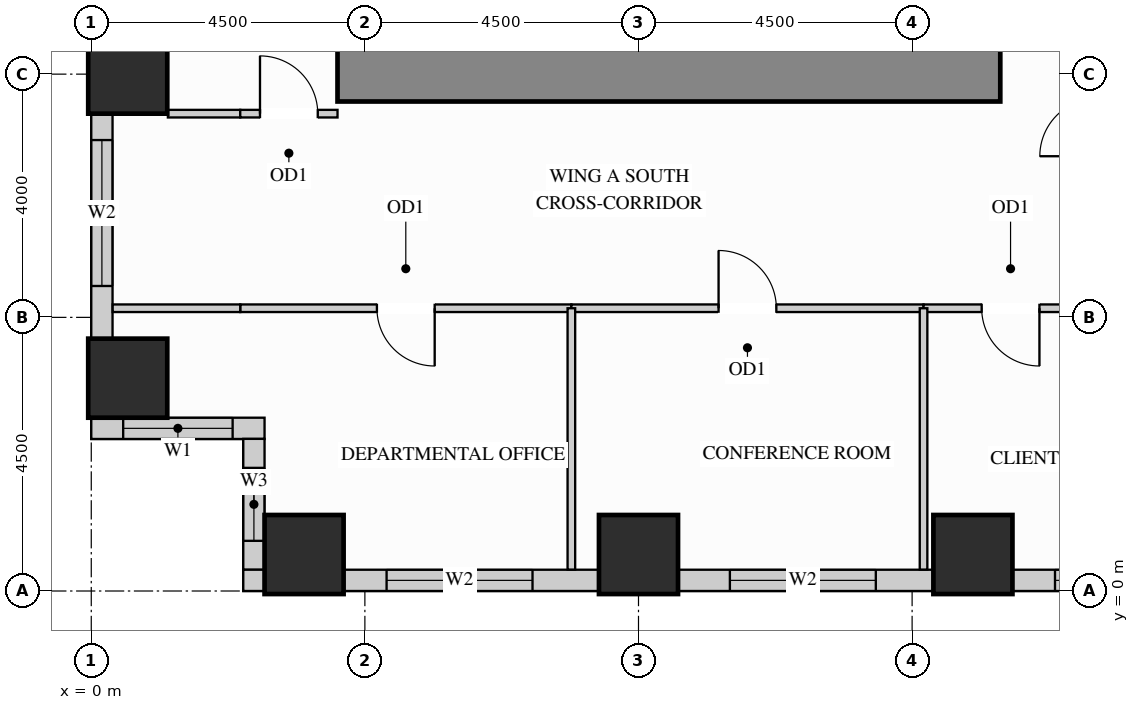
"""IFC4 building model, lengths in metres.
Left out: names, types, materials, properties, quantities, classifications, styles, units other than length and angle.
Written with IfcOpenShell. Run it as: python <this file> out.ifc"""

import sys

from ifc_helpers import new_model, si_unit, direction, frame, frame_2d, origin, origin_2d, place, context, subcontext, project, spatial, rectangle, extrude, source, transform, mapped, element, fill, save


model = new_model("IFC4")
c1 = context("Model", 3, precision=1e-05, world=origin(), true_north=direction((0.0, 1.0)))
c2 = subcontext(c1, "Body", "Model", "MODEL_VIEW")
j1 = project(units=[si_unit("LENGTHUNIT", "METRE"), si_unit("PLANEANGLEUNIT", "RADIAN")], contexts=[c1])
p1 = place(None, origin())
s1 = spatial("IfcSite", under=j1, at=p1, CompositionType="ELEMENT")
p2 = place(p1, origin())
s2 = spatial("IfcBuilding", under=s1, at=p2, CompositionType="ELEMENT")
p3 = place(p2, frame((0.0, 0.0, 44.1)))
s3 = spatial("IfcBuildingStorey", under=s2, at=p3, CompositionType="ELEMENT", Elevation=44.1)
m1 = source(origin(), c2, "Body", "SweptSolid", [
    extrude(rectangle(XDim=1.3, YDim=1.3, at=origin_2d()), origin(), (0.0, 0.0, 1.0), 3.38),
])
for number, where, z_axis, x_axis in (
    (1, (14.5, 0.6, 0.0), (0.0, 0.0, 1.0), (1.0, 0.0, 0.0)),
    (2, (3.5, 0.6, 0.0), (0.0, 0.0, 1.0), (1.0, 0.0, 0.0)),
    (3, (9.0, 0.6, 0.0), (0.0, 0.0, 1.0), (1.0, 0.0, 0.0)),
    (4, (0.6, 3.5, 0.0), (0.0, 0.0, 1.0), (1.0, 0.0, 0.0)),
    (5, (0.6, 8.5, 0.0), (0.0, 0.0, 1.0), (1.0, 0.0, 0.0)),
):
    element("IfcColumn", number, at=place(p3, frame(where, z_axis=z_axis, x_axis=x_axis)), inside=s3, PredefinedType="COLUMN", context=c2, shape_type="MappedRepresentation", body=[
        mapped(m1, transform((0.0, 0.0, 0.0), x_axis=(1.0, 0.0, 0.0), y_axis=(0.0, 1.0, 0.0), z_axis=(0.0, 0.0, 1.0))),
    ])
m2 = source(origin(), c2, "Body", "SweptSolid", [
    extrude(rectangle(XDim=10.9, YDim=0.9, at=frame_2d((5.45, 0.0))), origin(), (0.0, 0.0, 1.0), 3.38),
])
p4 = place(p3, frame((4.05, 8.5, 0.0), z_axis=(0.0, 0.0, 1.0), x_axis=(1.0, 0.0, 0.0)))
e6 = element("IfcWall", 6, at=p4, inside=s3, PredefinedType="SHEAR", context=c2, shape_type="MappedRepresentation", body=[
    mapped(m2, transform((0.0, 0.0, 0.0), x_axis=(1.0, 0.0, 0.0), y_axis=(0.0, 1.0, 0.0), z_axis=(0.0, 0.0, 1.0))),
])
p5 = place(p3, frame((0.175, 7.852, 0.0), z_axis=(0.0, 0.0, 1.0), x_axis=(0.0, -1.0, 0.0)))
e7 = element("IfcWall", 7, at=p5, inside=s3, PredefinedType="SOLIDWALL", context=c2, shape_type="SweptSolid", body=[
    extrude(rectangle(XDim=3.704, YDim=0.35, at=frame_2d((1.852, 0.0))), origin(), (0.0, 0.0, 1.0), 2.51),
])
p6 = place(p5, frame((0.436, 0.0, 0.78)))
e8 = element("IfcOpeningElement", 8, at=p6, cuts=e7, PredefinedType="OPENING", context=c2, shape_type="SweptSolid", body=[
    extrude(rectangle(XDim=2.4, YDim=1.55, at=frame_2d((1.2, 0.775))), frame((0.0, 0.185, 0.0), z_axis=(0.0, -1.0, 0.0), x_axis=(1.0, 0.0, 0.0)), (0.0, 0.0, 1.0), 0.37),
])
p7 = place(p3, frame((0.0, 2.675, 0.0), z_axis=(0.0, 0.0, 1.0), x_axis=(1.0, 0.0, 0.0)))
e9 = element("IfcWall", 9, at=p7, inside=s3, PredefinedType="SOLIDWALL", context=c2, shape_type="SweptSolid", body=[
    extrude(rectangle(XDim=2.85, YDim=0.35, at=frame_2d((1.425, 0.0))), origin(), (0.0, 0.0, 1.0), 3.365),
])
p8 = place(p7, frame((0.525, 0.0, 0.78)))
e10 = element("IfcOpeningElement", 10, at=p8, cuts=e9, PredefinedType="OPENING", context=c2, shape_type="SweptSolid", body=[
    extrude(rectangle(XDim=1.8, YDim=2.1, at=frame_2d((0.9, 1.05))), frame((0.0, 0.185, 0.0), z_axis=(0.0, -1.0, 0.0), x_axis=(1.0, 0.0, 0.0)), (0.0, 0.0, 1.0), 0.37),
])
p9 = place(p3, frame((2.675, 2.502, 0.0), z_axis=(0.0, 0.0, 1.0), x_axis=(0.0, -1.0, 0.0)))
e11 = element("IfcWall", 11, at=p9, inside=s3, PredefinedType="SOLIDWALL", context=c2, shape_type="SweptSolid", body=[
    extrude(rectangle(XDim=2.154, YDim=0.35, at=frame_2d((1.077, 0.0))), origin(), (0.0, 0.0, 1.0), 3.365),
])
p10 = place(p9, frame((0.477, 0.0, 0.78)))
e12 = element("IfcOpeningElement", 12, at=p10, cuts=e11, PredefinedType="OPENING", context=c2, shape_type="SweptSolid", body=[
    extrude(rectangle(XDim=1.2, YDim=2.1, at=frame_2d((0.6, 1.05))), frame((0.0, 0.185, 0.0), z_axis=(0.0, -1.0, 0.0), x_axis=(1.0, 0.0, 0.0)), (0.0, 0.0, 1.0), 0.37),
])
m3 = source(origin(), c2, "Body", "SweptSolid", [
    extrude(rectangle(XDim=0.352, YDim=0.35, at=frame_2d((0.176, 0.0))), origin(), (0.0, 0.0, 1.0), 3.365),
])
p11 = place(p3, frame((2.5, 0.175, 0.0), z_axis=(0.0, 0.0, 1.0), x_axis=(1.0, 0.0, 0.0)))
e13 = element("IfcWall", 13, at=p11, inside=s3, PredefinedType="SOLIDWALL", context=c2, shape_type="MappedRepresentation", body=[
    mapped(m3, transform((0.0, 0.0, 0.0), x_axis=(1.0, 0.0, 0.0), y_axis=(0.0, 1.0, 0.0), z_axis=(0.0, 0.0, 1.0))),
])
p12 = place(p3, frame((4.148, 0.175, 0.0), z_axis=(0.0, 0.0, 1.0), x_axis=(1.0, 0.0, 0.0)))
e14 = element("IfcWall", 14, at=p12, inside=s3, PredefinedType="SOLIDWALL", context=c2, shape_type="SweptSolid", body=[
    extrude(rectangle(XDim=4.204, YDim=0.35, at=frame_2d((2.102, 0.0))), origin(), (0.0, 0.0, 1.0), 2.51),
])
p13 = place(p12, frame((0.709, 0.0, 0.78)))
e15 = element("IfcOpeningElement", 15, at=p13, cuts=e14, PredefinedType="OPENING", context=c2, shape_type="SweptSolid", body=[
    extrude(rectangle(XDim=2.4, YDim=1.55, at=frame_2d((1.2, 0.775))), frame((0.0, 0.185, 0.0), z_axis=(0.0, -1.0, 0.0), x_axis=(1.0, 0.0, 0.0)), (0.0, 0.0, 1.0), 0.37),
])
p14 = place(p3, frame((9.648, 0.175, 0.0), z_axis=(0.0, 0.0, 1.0), x_axis=(1.0, 0.0, 0.0)))
e16 = element("IfcWall", 16, at=p14, inside=s3, PredefinedType="SOLIDWALL", context=c2, shape_type="SweptSolid", body=[
    extrude(rectangle(XDim=4.204, YDim=0.35, at=frame_2d((2.102, 0.0))), origin(), (0.0, 0.0, 1.0), 2.51),
])
p15 = place(p14, frame((0.855, 0.0, 0.78)))
e17 = element("IfcOpeningElement", 17, at=p15, cuts=e16, PredefinedType="OPENING", context=c2, shape_type="SweptSolid", body=[
    extrude(rectangle(XDim=2.4, YDim=1.55, at=frame_2d((1.2, 0.775))), frame((0.0, 0.185, 0.0), z_axis=(0.0, -1.0, 0.0), x_axis=(1.0, 0.0, 0.0)), (0.0, 0.0, 1.0), 0.37),
])
p16 = place(p3, frame((15.148, 0.175, 0.0), z_axis=(0.0, 0.0, 1.0), x_axis=(1.0, 0.0, 0.0)))
e18 = element("IfcWall", 18, at=p16, inside=s3, PredefinedType="SOLIDWALL", context=c2, shape_type="SweptSolid", body=[
    extrude(rectangle(XDim=3.204, YDim=0.35, at=frame_2d((1.602, 0.0))), origin(), (0.0, 0.0, 1.0), 2.51),
])
p17 = place(p16, frame((0.702, 0.0, 0.78)))
e19 = element("IfcOpeningElement", 19, at=p17, cuts=e18, PredefinedType="OPENING", context=c2, shape_type="SweptSolid", body=[
    extrude(rectangle(XDim=1.8, YDim=1.55, at=frame_2d((0.9, 0.775))), frame((0.0, 0.185, 0.0), z_axis=(0.0, -1.0, 0.0), x_axis=(1.0, 0.0, 0.0)), (0.0, 0.0, 1.0), 0.37),
])
m4 = source(origin(), c2, "Body", "SweptSolid", [
    extrude(rectangle(XDim=1.19, YDim=0.125, at=frame_2d((0.595, 0.0))), origin(), (0.0, 0.0, 1.0), 3.365),
])
p18 = place(p3, frame((1.26, 7.85, 0.0), z_axis=(0.0, 0.0, 1.0), x_axis=(1.0, 0.0, 0.0)))
e20 = element("IfcWall", 20, at=p18, inside=s3, PredefinedType="PARTITIONING", context=c2, shape_type="MappedRepresentation", body=[
    mapped(m4, transform((0.0, 0.0, 0.0), x_axis=(1.0, 0.0, 0.0), y_axis=(0.0, 1.0, 0.0), z_axis=(0.0, 0.0, 1.0))),
])
p19 = place(p3, frame((2.45, 7.85, 0.0), z_axis=(0.0, 0.0, 1.0), x_axis=(1.0, 0.0, 0.0)))
e21 = element("IfcWall", 21, at=p19, inside=s3, PredefinedType="PARTITIONING", context=c2, shape_type="SweptSolid", body=[
    extrude(rectangle(XDim=1.6, YDim=0.125, at=frame_2d((0.8, 0.0))), origin(), (0.0, 0.0, 1.0), 3.365),
])
p20 = place(p19, frame((0.325, 0.0, 0.0)))
e22 = element("IfcOpeningElement", 22, at=p20, cuts=e21, PredefinedType="OPENING", context=c2, shape_type="SweptSolid", body=[
    extrude(rectangle(XDim=0.95, YDim=2.15, at=frame_2d((0.475, 1.075))), frame((0.0, 0.073, 0.0), z_axis=(0.0, -1.0, 0.0), x_axis=(1.0, 0.0, 0.0)), (0.0, 0.0, 1.0), 0.145),
])
p21 = place(p3, frame((2.45, 4.65, 0.0), z_axis=(0.0, 0.0, 1.0), x_axis=(1.0, 0.0, 0.0)))
e23 = element("IfcWall", 23, at=p21, inside=s3, PredefinedType="PARTITIONING", context=c2, shape_type="SweptSolid", body=[
    extrude(rectangle(XDim=5.446, YDim=0.125, at=frame_2d((2.723, 0.0))), origin(), (0.0, 0.0, 1.0), 2.828),
])
p22 = place(p21, frame((2.248, 0.0, 0.0)))
e24 = element("IfcOpeningElement", 24, at=p22, cuts=e23, PredefinedType="OPENING", context=c2, shape_type="SweptSolid", body=[
    extrude(rectangle(XDim=0.95, YDim=2.15, at=frame_2d((0.475, 1.075))), frame((0.0, 0.073, 0.0), z_axis=(0.0, -1.0, 0.0), x_axis=(1.0, 0.0, 0.0)), (0.0, 0.0, 1.0), 0.145),
])
p23 = place(p3, frame((7.896, 4.65, 0.0), z_axis=(0.0, 0.0, 1.0), x_axis=(1.0, 0.0, 0.0)))
e25 = element("IfcWall", 25, at=p23, inside=s3, PredefinedType="PARTITIONING", context=c2, shape_type="SweptSolid", body=[
    extrude(rectangle(XDim=5.792, YDim=0.125, at=frame_2d((2.896, 0.0))), origin(), (0.0, 0.0, 1.0), 2.828),
])
p24 = place(p23, frame((2.421, 0.0, 0.0)))
e26 = element("IfcOpeningElement", 26, at=p24, cuts=e25, PredefinedType="OPENING", context=c2, shape_type="SweptSolid", body=[
    extrude(rectangle(XDim=0.95, YDim=2.15, at=frame_2d((0.475, 1.075))), frame((0.0, 0.073, 0.0), z_axis=(0.0, -1.0, 0.0), x_axis=(1.0, 0.0, 0.0)), (0.0, 0.0, 1.0), 0.145),
])
p25 = place(p3, frame((13.688, 4.65, 0.0), z_axis=(0.0, 0.0, 1.0), x_axis=(1.0, 0.0, 0.0)))
e27 = element("IfcWall", 27, at=p25, inside=s3, PredefinedType="PARTITIONING", context=c2, shape_type="SweptSolid", body=[
    extrude(rectangle(XDim=2.862, YDim=0.125, at=frame_2d((1.431, 0.0))), origin(), (0.0, 0.0, 1.0), 2.828),
])
p26 = place(p25, frame((0.956, 0.0, 0.0)))
e28 = element("IfcOpeningElement", 28, at=p26, cuts=e27, PredefinedType="OPENING", context=c2, shape_type="SweptSolid", body=[
    extrude(rectangle(XDim=0.95, YDim=2.15, at=frame_2d((0.475, 1.075))), frame((0.0, 0.073, 0.0), z_axis=(0.0, -1.0, 0.0), x_axis=(1.0, 0.0, 0.0)), (0.0, 0.0, 1.0), 0.145),
])
m5 = source(origin(), c2, "Body", "SweptSolid", [
    extrude(rectangle(XDim=2.098, YDim=0.125, at=frame_2d((1.049, 0.0))), origin(), (0.0, 0.0, 1.0), 2.828),
])
p27 = place(p3, frame((0.352, 4.65, 0.0), z_axis=(0.0, 0.0, 1.0), x_axis=(1.0, 0.0, 0.0)))
e29 = element("IfcWall", 29, at=p27, inside=s3, PredefinedType="PARTITIONING", context=c2, shape_type="MappedRepresentation", body=[
    mapped(m5, transform((0.0, 0.0, 0.0), x_axis=(1.0, 0.0, 0.0), y_axis=(0.0, 1.0, 0.0), z_axis=(0.0, 0.0, 1.0))),
])
m6 = source(origin(), c2, "Body", "SweptSolid", [
    extrude(rectangle(XDim=4.298, YDim=0.125, at=frame_2d((2.149, 0.0))), origin(), (0.0, 0.0, 1.0), 3.365),
])
for number, where, z_axis, x_axis in (
    (30, (7.896, 0.352, 0.0), (0.0, 0.0, 1.0), (0.0, 1.0, 0.0)),
    (31, (13.688, 0.352, 0.0), (0.0, 0.0, 1.0), (0.0, 1.0, 0.0)),
):
    element("IfcWall", number, at=place(p3, frame(where, z_axis=z_axis, x_axis=x_axis)), inside=s3, PredefinedType="PARTITIONING", context=c2, shape_type="MappedRepresentation", body=[
        mapped(m6, transform((0.0, 0.0, 0.0), x_axis=(1.0, 0.0, 0.0), y_axis=(0.0, 1.0, 0.0), z_axis=(0.0, 0.0, 1.0))),
    ])
m7 = source(origin(), c2, "Body", "SweptSolid", [
    extrude(rectangle(XDim=0.95, YDim=2.15, at=frame_2d((0.475, 1.075))), frame((0.0, 0.025, 0.0), z_axis=(0.0, -1.0, 0.0), x_axis=(1.0, 0.0, 0.0)), (0.0, 0.0, 1.0), 0.05),
])
p28 = place(p22, origin())
e32 = element("IfcDoor", 32, at=p28, inside=s3, OperationType="SINGLE_SWING_RIGHT", PredefinedType="DOOR", context=c2, shape_type="MappedRepresentation", body=[
    mapped(m7, transform((0.0, 0.0, 0.0), x_axis=(1.0, 0.0, 0.0), y_axis=(0.0, 1.0, 0.0), z_axis=(0.0, 0.0, 1.0))),
])
fill(e24, e32)
p29 = place(p24, origin())
e33 = element("IfcDoor", 33, at=p29, inside=s3, OperationType="SINGLE_SWING_LEFT", PredefinedType="DOOR", context=c2, shape_type="MappedRepresentation", body=[
    mapped(m7, transform((0.0, 0.0, 0.0), x_axis=(1.0, 0.0, 0.0), y_axis=(0.0, 1.0, 0.0), z_axis=(0.0, 0.0, 1.0))),
])
fill(e26, e33)
p30 = place(p26, origin())
e34 = element("IfcDoor", 34, at=p30, inside=s3, OperationType="SINGLE_SWING_RIGHT", PredefinedType="DOOR", context=c2, shape_type="MappedRepresentation", body=[
    mapped(m7, transform((0.0, 0.0, 0.0), x_axis=(1.0, 0.0, 0.0), y_axis=(0.0, 1.0, 0.0), z_axis=(0.0, 0.0, 1.0))),
])
fill(e28, e34)
p31 = place(p20, origin())
e35 = element("IfcDoor", 35, at=p31, inside=s3, OperationType="SINGLE_SWING_LEFT", PredefinedType="DOOR", context=c2, shape_type="MappedRepresentation", body=[
    mapped(m7, transform((0.0, 0.0, 0.0), x_axis=(1.0, 0.0, 0.0), y_axis=(0.0, 1.0, 0.0), z_axis=(0.0, 0.0, 1.0))),
])
fill(e22, e35)
m8 = source(origin(), c2, "Body", "SweptSolid", [
    extrude(rectangle(XDim=1.8, YDim=2.1, at=frame_2d((0.9, 1.05))), frame((0.0, 0.03, 0.0), z_axis=(0.0, -1.0, 0.0), x_axis=(1.0, 0.0, 0.0)), (0.0, 0.0, 1.0), 0.06),
])
p32 = place(p8, origin())
e36 = element("IfcWindow", 36, at=p32, inside=s3, PartitioningType="SINGLE_PANEL", PredefinedType="WINDOW", context=c2, shape_type="MappedRepresentation", body=[
    mapped(m8, transform((0.0, 0.0, 0.0), x_axis=(1.0, 0.0, 0.0), y_axis=(0.0, 1.0, 0.0), z_axis=(0.0, 0.0, 1.0))),
])
fill(e10, e36)
m9 = source(origin(), c2, "Body", "SweptSolid", [
    extrude(rectangle(XDim=1.8, YDim=1.55, at=frame_2d((0.9, 0.775))), frame((0.0, 0.03, 0.0), z_axis=(0.0, -1.0, 0.0), x_axis=(1.0, 0.0, 0.0)), (0.0, 0.0, 1.0), 0.06),
])
p33 = place(p17, origin())
e37 = element("IfcWindow", 37, at=p33, inside=s3, PartitioningType="SINGLE_PANEL", PredefinedType="WINDOW", context=c2, shape_type="MappedRepresentation", body=[
    mapped(m9, transform((0.0, 0.0, 0.0), x_axis=(1.0, 0.0, 0.0), y_axis=(0.0, 1.0, 0.0), z_axis=(0.0, 0.0, 1.0))),
])
fill(e19, e37)
m10 = source(origin(), c2, "Body", "SweptSolid", [
    extrude(rectangle(XDim=2.4, YDim=1.55, at=frame_2d((1.2, 0.775))), frame((0.0, 0.03, 0.0), z_axis=(0.0, -1.0, 0.0), x_axis=(1.0, 0.0, 0.0)), (0.0, 0.0, 1.0), 0.06),
])
p34 = place(p6, origin())
e38 = element("IfcWindow", 38, at=p34, inside=s3, PartitioningType="SINGLE_PANEL", PredefinedType="WINDOW", context=c2, shape_type="MappedRepresentation", body=[
    mapped(m10, transform((0.0, 0.0, 0.0), x_axis=(1.0, 0.0, 0.0), y_axis=(0.0, 1.0, 0.0), z_axis=(0.0, 0.0, 1.0))),
])
fill(e8, e38)
p35 = place(p13, origin())
e39 = element("IfcWindow", 39, at=p35, inside=s3, PartitioningType="SINGLE_PANEL", PredefinedType="WINDOW", context=c2, shape_type="MappedRepresentation", body=[
    mapped(m10, transform((0.0, 0.0, 0.0), x_axis=(1.0, 0.0, 0.0), y_axis=(0.0, 1.0, 0.0), z_axis=(0.0, 0.0, 1.0))),
])
fill(e15, e39)
p36 = place(p15, origin())
e40 = element("IfcWindow", 40, at=p36, inside=s3, PartitioningType="SINGLE_PANEL", PredefinedType="WINDOW", context=c2, shape_type="MappedRepresentation", body=[
    mapped(m10, transform((0.0, 0.0, 0.0), x_axis=(1.0, 0.0, 0.0), y_axis=(0.0, 1.0, 0.0), z_axis=(0.0, 0.0, 1.0))),
])
fill(e17, e40)
m11 = source(origin(), c2, "Body", "SweptSolid", [
    extrude(rectangle(XDim=1.2, YDim=2.1, at=frame_2d((0.6, 1.05))), frame((0.0, 0.03, 0.0), z_axis=(0.0, -1.0, 0.0), x_axis=(1.0, 0.0, 0.0)), (0.0, 0.0, 1.0), 0.06),
])
p37 = place(p10, origin())
e41 = element("IfcWindow", 41, at=p37, inside=s3, PartitioningType="SINGLE_PANEL", PredefinedType="WINDOW", context=c2, shape_type="MappedRepresentation", body=[
    mapped(m11, transform((0.0, 0.0, 0.0), x_axis=(1.0, 0.0, 0.0), y_axis=(0.0, 1.0, 0.0), z_axis=(0.0, 0.0, 1.0))),
])
fill(e12, e41)
save(model, sys.argv[1])
